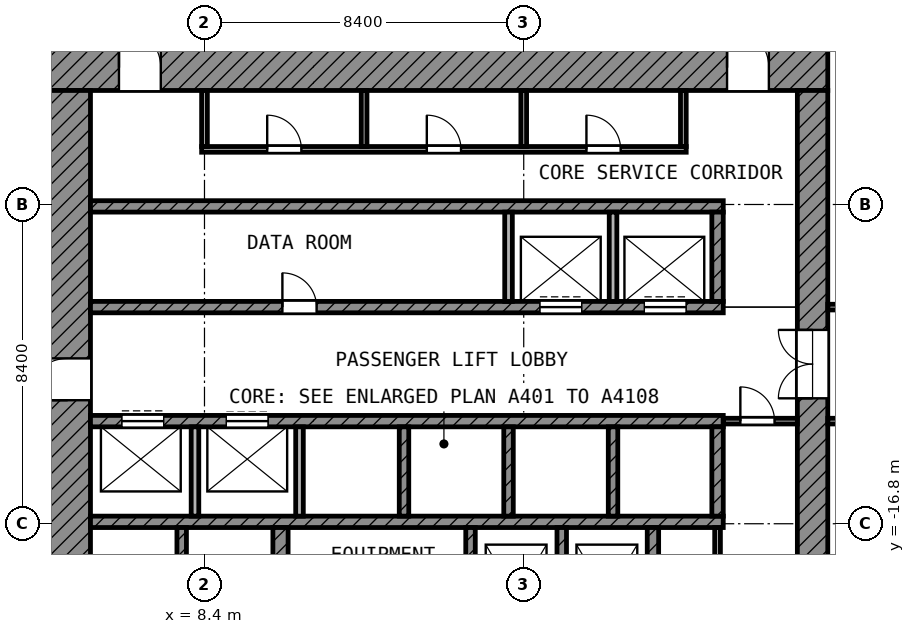
"""IFC4 building model, lengths in metres.
Left out: names, types, materials, properties, quantities, classifications, styles, units other than length and angle.
Written with IfcOpenShell. Run it as: python <this file> out.ifc"""

import sys

from ifc_helpers import new_model, si_unit, direction, frame, frame_2d, origin, place, context, subcontext, project, spatial, rectangle, extrude, element, fill, save


model = new_model("IFC4")
c1 = context("Model", 3, precision=1e-05, world=origin(), true_north=direction((0.0, 1.0)))
c2 = subcontext(c1, "Body", "Model", "MODEL_VIEW")
j1 = project(units=[si_unit("LENGTHUNIT", "METRE"), si_unit("PLANEANGLEUNIT", "RADIAN")], contexts=[c1])
p1 = place(None, origin())
s1 = spatial("IfcSite", under=j1, at=p1, CompositionType="ELEMENT")
p2 = place(p1, origin())
s2 = spatial("IfcBuilding", under=s1, at=p2, CompositionType="ELEMENT")
p3 = place(p2, frame((0.0, 0.0, 230.6)))
s3 = spatial("IfcBuildingStorey", under=s2, at=p3, CompositionType="ELEMENT", Elevation=230.6)
p4 = place(p3, frame((4.2, -4.8, 0.0), z_axis=(0.0, 0.0, 1.0), x_axis=(1.0, 0.0, 0.0)))
e1 = element("IfcWall", 1, at=p4, inside=s3, PredefinedType="SHEAR", context=c2, shape_type="SweptSolid", body=[
    extrude(rectangle(XDim=20.6, YDim=1.2, at=frame_2d((10.3, 0.0))), origin(), (0.0, 0.0, 1.0), 3.6),
])
p5 = place(p4, frame((1.95, 0.0, 0.0)))
e2 = element("IfcOpeningElement", 2, at=p5, cuts=e1, PredefinedType="OPENING", context=c2, shape_type="SweptSolid", body=[
    extrude(rectangle(XDim=1.1, YDim=2.1, at=frame_2d((0.55, 1.05))), frame((0.0, 0.61, 0.0), z_axis=(0.0, -1.0, 0.0), x_axis=(1.0, 0.0, 0.0)), (0.0, 0.0, 1.0), 1.22),
])
p6 = place(p4, frame((17.95, 0.0, 0.0)))
e3 = element("IfcOpeningElement", 3, at=p6, cuts=e1, PredefinedType="OPENING", context=c2, shape_type="SweptSolid", body=[
    extrude(rectangle(XDim=1.1, YDim=2.1, at=frame_2d((0.55, 1.05))), frame((0.0, 0.61, 0.0), z_axis=(0.0, -1.0, 0.0), x_axis=(1.0, 0.0, 0.0)), (0.0, 0.0, 1.0), 1.22),
])
p7 = place(p3, frame((4.8, -24.8, 0.0), z_axis=(0.0, 0.0, 1.0), x_axis=(0.0, 1.0, 0.0)))
e4 = element("IfcWall", 4, at=p7, inside=s3, PredefinedType="SHEAR", context=c2, shape_type="SweptSolid", body=[
    extrude(rectangle(XDim=19.4, YDim=1.2, at=frame_2d((9.7, 0.0))), origin(), (0.0, 0.0, 1.0), 3.6),
])
p8 = place(p7, frame((11.25, 0.0, 0.0)))
e5 = element("IfcOpeningElement", 5, at=p8, cuts=e4, PredefinedType="OPENING", context=c2, shape_type="SweptSolid", body=[
    extrude(rectangle(XDim=1.1, YDim=2.1, at=frame_2d((0.55, 1.05))), frame((0.0, 0.61, 0.0), z_axis=(0.0, -1.0, 0.0), x_axis=(1.0, 0.0, 0.0)), (0.0, 0.0, 1.0), 1.22),
])
p9 = place(p7, frame((1.95, 0.0, 0.0)))
e6 = element("IfcOpeningElement", 6, at=p9, cuts=e4, PredefinedType="OPENING", context=c2, shape_type="SweptSolid", body=[
    extrude(rectangle(XDim=1.1, YDim=2.1, at=frame_2d((0.55, 1.05))), frame((0.0, 0.61, 0.0), z_axis=(0.0, -1.0, 0.0), x_axis=(1.0, 0.0, 0.0)), (0.0, 0.0, 1.0), 1.22),
])
p10 = place(p3, frame((24.4, -24.0, 0.0), z_axis=(0.0, 0.0, 1.0), x_axis=(0.0, 1.0, 0.0)))
e7 = element("IfcWall", 7, at=p10, inside=s3, PredefinedType="SHEAR", context=c2, shape_type="SweptSolid", body=[
    extrude(rectangle(XDim=18.6, YDim=0.8, at=frame_2d((9.3, 0.0))), origin(), (0.0, 0.0, 1.0), 3.6),
])
p11 = place(p10, frame((10.5, 0.0, 0.0)))
e8 = element("IfcOpeningElement", 8, at=p11, cuts=e7, PredefinedType="OPENING", context=c2, shape_type="SweptSolid", body=[
    extrude(rectangle(XDim=1.8, YDim=2.1, at=frame_2d((0.9, 1.05))), frame((0.0, 0.41, 0.0), z_axis=(0.0, -1.0, 0.0), x_axis=(1.0, 0.0, 0.0)), (0.0, 0.0, 1.0), 0.82),
])
p12 = place(p3, frame((5.4, -8.45, 0.0), z_axis=(0.0, 0.0, 1.0), x_axis=(1.0, 0.0, 0.0)))
e9 = element("IfcWall", 9, at=p12, inside=s3, PredefinedType="SHEAR", context=c2, shape_type="SweptSolid", body=[
    extrude(rectangle(XDim=16.65, YDim=0.3, at=frame_2d((8.325, 0.0))), origin(), (0.0, 0.0, 1.0), 3.6),
])
p13 = place(p3, frame((5.4, -11.1, 0.0), z_axis=(0.0, 0.0, 1.0), x_axis=(1.0, 0.0, 0.0)))
e10 = element("IfcWall", 10, at=p13, inside=s3, PredefinedType="SHEAR", context=c2, shape_type="SweptSolid", body=[
    extrude(rectangle(XDim=16.65, YDim=0.3, at=frame_2d((8.325, 0.0))), origin(), (0.0, 0.0, 1.0), 3.6),
])
p14 = place(p13, frame((11.825, 0.0, 0.0)))
e11 = element("IfcOpeningElement", 11, at=p14, cuts=e10, PredefinedType="OPENING", context=c2, shape_type="SweptSolid", body=[
    extrude(rectangle(XDim=1.1, YDim=2.1, at=frame_2d((0.55, 1.05))), frame((0.0, 0.16, 0.0), z_axis=(0.0, -1.0, 0.0), x_axis=(1.0, 0.0, 0.0)), (0.0, 0.0, 1.0), 0.32),
])
p15 = place(p13, frame((14.575, 0.0, 0.0)))
e12 = element("IfcOpeningElement", 12, at=p15, cuts=e10, PredefinedType="OPENING", context=c2, shape_type="SweptSolid", body=[
    extrude(rectangle(XDim=1.1, YDim=2.1, at=frame_2d((0.55, 1.05))), frame((0.0, 0.16, 0.0), z_axis=(0.0, -1.0, 0.0), x_axis=(1.0, 0.0, 0.0)), (0.0, 0.0, 1.0), 0.32),
])
p16 = place(p13, frame((5.05, 0.0, 0.0)))
e13 = element("IfcOpeningElement", 13, at=p16, cuts=e10, PredefinedType="OPENING", context=c2, shape_type="SweptSolid", body=[
    extrude(rectangle(XDim=0.9, YDim=2.1, at=frame_2d((0.45, 1.05))), frame((0.0, 0.16, 0.0), z_axis=(0.0, -1.0, 0.0), x_axis=(1.0, 0.0, 0.0)), (0.0, 0.0, 1.0), 0.32),
])
p17 = place(p3, frame((5.4, -14.1, 0.0), z_axis=(0.0, 0.0, 1.0), x_axis=(1.0, 0.0, 0.0)))
e14 = element("IfcWall", 14, at=p17, inside=s3, PredefinedType="SHEAR", context=c2, shape_type="SweptSolid", body=[
    extrude(rectangle(XDim=16.65, YDim=0.3, at=frame_2d((8.325, 0.0))), origin(), (0.0, 0.0, 1.0), 3.6),
])
p18 = place(p17, frame((0.825, 0.0, 0.0)))
e15 = element("IfcOpeningElement", 15, at=p18, cuts=e14, PredefinedType="OPENING", context=c2, shape_type="SweptSolid", body=[
    extrude(rectangle(XDim=1.1, YDim=2.1, at=frame_2d((0.55, 1.05))), frame((0.0, 0.16, 0.0), z_axis=(0.0, -1.0, 0.0), x_axis=(1.0, 0.0, 0.0)), (0.0, 0.0, 1.0), 0.32),
])
p19 = place(p17, frame((3.575, 0.0, 0.0)))
e16 = element("IfcOpeningElement", 16, at=p19, cuts=e14, PredefinedType="OPENING", context=c2, shape_type="SweptSolid", body=[
    extrude(rectangle(XDim=1.1, YDim=2.1, at=frame_2d((0.55, 1.05))), frame((0.0, 0.16, 0.0), z_axis=(0.0, -1.0, 0.0), x_axis=(1.0, 0.0, 0.0)), (0.0, 0.0, 1.0), 0.32),
])
p20 = place(p3, frame((5.4, -16.75, 0.0), z_axis=(0.0, 0.0, 1.0), x_axis=(1.0, 0.0, 0.0)))
e17 = element("IfcWall", 17, at=p20, inside=s3, PredefinedType="SHEAR", context=c2, shape_type="SweptSolid", body=[
    extrude(rectangle(XDim=16.65, YDim=0.3, at=frame_2d((8.325, 0.0))), origin(), (0.0, 0.0, 1.0), 3.6),
])
p21 = place(p3, frame((10.4, -20.05, 0.0), z_axis=(0.0, 0.0, 1.0), x_axis=(0.0, 1.0, 0.0)))
e18 = element("IfcWall", 18, at=p21, inside=s3, PredefinedType="SHEAR", context=c2, shape_type="SweptSolid", body=[
    extrude(rectangle(XDim=3.15, YDim=0.4, at=frame_2d((1.575, 0.0))), origin(), (0.0, 0.0, 1.0), 3.6),
])
p22 = place(p3, frame((20.2, -20.35, 0.0), z_axis=(0.0, 0.0, 1.0), x_axis=(0.0, 1.0, 0.0)))
e19 = element("IfcWall", 19, at=p22, inside=s3, PredefinedType="SHEAR", context=c2, shape_type="SweptSolid", body=[
    extrude(rectangle(XDim=3.45, YDim=0.3, at=frame_2d((1.725, 0.0))), origin(), (0.0, 0.0, 1.0), 3.6),
])
p23 = place(p3, frame((21.9, -10.95, 0.0), z_axis=(0.0, 0.0, 1.0), x_axis=(0.0, 1.0, 0.0)))
e20 = element("IfcWall", 20, at=p23, inside=s3, PredefinedType="SHEAR", context=c2, shape_type="SweptSolid", body=[
    extrude(rectangle(XDim=2.35, YDim=0.3, at=frame_2d((1.175, 0.0))), origin(), (0.0, 0.0, 1.0), 3.6),
])
p24 = place(p3, frame((21.9, -16.6, 0.0), z_axis=(0.0, 0.0, 1.0), x_axis=(0.0, 1.0, 0.0)))
e21 = element("IfcWall", 21, at=p24, inside=s3, PredefinedType="SHEAR", context=c2, shape_type="SweptSolid", body=[
    extrude(rectangle(XDim=2.35, YDim=0.3, at=frame_2d((1.175, 0.0))), origin(), (0.0, 0.0, 1.0), 3.6),
])
for number, where, z_axis, x_axis in (
    (22, (7.8, -20.05, 0.0), (0.0, 0.0, 1.0), (0.0, 1.0, 0.0)),
    (23, (15.4, -20.05, 0.0), (0.0, 0.0, 1.0), (0.0, 1.0, 0.0)),
    (24, (17.8, -20.05, 0.0), (0.0, 0.0, 1.0), (0.0, 1.0, 0.0)),
):
    element("IfcWall", number, at=place(p3, frame(where, z_axis=z_axis, x_axis=x_axis)), inside=s3, PredefinedType="SHEAR", context=c2, shape_type="SweptSolid", body=[
        extrude(rectangle(XDim=3.15, YDim=0.25, at=frame_2d((1.575, 0.0))), origin(), (0.0, 0.0, 1.0), 3.6),
    ])
for number, where, z_axis, x_axis in (
    (25, (16.4, -10.95, 0.0), (0.0, 0.0, 1.0), (0.0, 1.0, 0.0)),
    (26, (19.15, -10.95, 0.0), (0.0, 0.0, 1.0), (0.0, 1.0, 0.0)),
):
    element("IfcWall", number, at=place(p3, frame(where, z_axis=z_axis, x_axis=x_axis)), inside=s3, PredefinedType="PARTITIONING", context=c2, shape_type="SweptSolid", body=[
        extrude(rectangle(XDim=2.35, YDim=0.2, at=frame_2d((1.175, 0.0))), origin(), (0.0, 0.0, 1.0), 3.6),
    ])
for number, where, z_axis, x_axis in (
    (27, (8.15, -16.6, 0.0), (0.0, 0.0, 1.0), (0.0, 1.0, 0.0)),
    (28, (10.9, -16.6, 0.0), (0.0, 0.0, 1.0), (0.0, 1.0, 0.0)),
):
    element("IfcWall", number, at=place(p3, frame(where, z_axis=z_axis, x_axis=x_axis)), inside=s3, PredefinedType="PARTITIONING", context=c2, shape_type="SweptSolid", body=[
        extrude(rectangle(XDim=2.35, YDim=0.2, at=frame_2d((1.175, 0.0))), origin(), (0.0, 0.0, 1.0), 3.6),
    ])
for number, where, z_axis, x_axis in (
    (29, (13.65, -16.6, 0.0), (0.0, 0.0, 1.0), (0.0, 1.0, 0.0)),
    (30, (16.4, -16.6, 0.0), (0.0, 0.0, 1.0), (0.0, 1.0, 0.0)),
    (31, (19.15, -16.6, 0.0), (0.0, 0.0, 1.0), (0.0, 1.0, 0.0)),
):
    element("IfcWall", number, at=place(p3, frame(where, z_axis=z_axis, x_axis=x_axis)), inside=s3, PredefinedType="SHEAR", context=c2, shape_type="SweptSolid", body=[
        extrude(rectangle(XDim=2.35, YDim=0.25, at=frame_2d((1.175, 0.0))), origin(), (0.0, 0.0, 1.0), 3.6),
    ])
p25 = place(p3, frame((21.9, -19.05, 0.0), z_axis=(0.0, 0.0, 1.0), x_axis=(0.0, 1.0, 0.0)))
e32 = element("IfcWall", 32, at=p25, inside=s3, PredefinedType="PARTITIONING", context=c2, shape_type="SweptSolid", body=[
    extrude(rectangle(XDim=2.15, YDim=0.15, at=frame_2d((1.075, 0.0))), origin(), (0.0, 0.0, 1.0), 3.6),
])
p26 = place(p3, frame((22.05, -14.1, 0.0), z_axis=(0.0, 0.0, 1.0), x_axis=(1.0, 0.0, 0.0)))
e33 = element("IfcWall", 33, at=p26, inside=s3, PredefinedType="PARTITIONING", context=c2, shape_type="SweptSolid", body=[
    extrude(rectangle(XDim=1.95, YDim=0.15, at=frame_2d((0.975, 0.0))), origin(), (0.0, 0.0, 1.0), 3.6),
])
p27 = place(p26, frame((0.45, 0.0, 0.0)))
e34 = element("IfcOpeningElement", 34, at=p27, cuts=e33, PredefinedType="OPENING", context=c2, shape_type="SweptSolid", body=[
    extrude(rectangle(XDim=0.9, YDim=2.1, at=frame_2d((0.45, 1.05))), frame((0.0, 0.085, 0.0), z_axis=(0.0, -1.0, 0.0), x_axis=(1.0, 0.0, 0.0)), (0.0, 0.0, 1.0), 0.17),
])
p28 = place(p3, frame((8.325, -6.95, 0.0), z_axis=(0.0, 0.0, 1.0), x_axis=(1.0, 0.0, 0.0)))
e35 = element("IfcWall", 35, at=p28, inside=s3, PredefinedType="PARTITIONING", context=c2, shape_type="SweptSolid", body=[
    extrude(rectangle(XDim=12.75, YDim=0.15, at=frame_2d((6.375, 0.0))), origin(), (0.0, 0.0, 1.0), 3.6),
])
p29 = place(p28, frame((1.725, 0.0, 0.0)))
e36 = element("IfcOpeningElement", 36, at=p29, cuts=e35, PredefinedType="OPENING", context=c2, shape_type="SweptSolid", body=[
    extrude(rectangle(XDim=0.9, YDim=2.1, at=frame_2d((0.45, 1.05))), frame((0.0, 0.085, 0.0), z_axis=(0.0, -1.0, 0.0), x_axis=(1.0, 0.0, 0.0)), (0.0, 0.0, 1.0), 0.17),
])
p30 = place(p28, frame((5.925, 0.0, 0.0)))
e37 = element("IfcOpeningElement", 37, at=p30, cuts=e35, PredefinedType="OPENING", context=c2, shape_type="SweptSolid", body=[
    extrude(rectangle(XDim=0.9, YDim=2.1, at=frame_2d((0.45, 1.05))), frame((0.0, 0.085, 0.0), z_axis=(0.0, -1.0, 0.0), x_axis=(1.0, 0.0, 0.0)), (0.0, 0.0, 1.0), 0.17),
])
p31 = place(p28, frame((10.125, 0.0, 0.0)))
e38 = element("IfcOpeningElement", 38, at=p31, cuts=e35, PredefinedType="OPENING", context=c2, shape_type="SweptSolid", body=[
    extrude(rectangle(XDim=0.9, YDim=2.1, at=frame_2d((0.45, 1.05))), frame((0.0, 0.085, 0.0), z_axis=(0.0, -1.0, 0.0), x_axis=(1.0, 0.0, 0.0)), (0.0, 0.0, 1.0), 0.17),
])
for number, where, z_axis, x_axis in (
    (39, (8.4, -6.875, 0.0), (0.0, 0.0, 1.0), (0.0, 1.0, 0.0)),
    (40, (12.6, -6.875, 0.0), (0.0, 0.0, 1.0), (0.0, 1.0, 0.0)),
    (41, (16.8, -6.875, 0.0), (0.0, 0.0, 1.0), (0.0, 1.0, 0.0)),
    (42, (21.0, -6.875, 0.0), (0.0, 0.0, 1.0), (0.0, 1.0, 0.0)),
):
    element("IfcWall", number, at=place(p3, frame(where, z_axis=z_axis, x_axis=x_axis)), inside=s3, PredefinedType="PARTITIONING", context=c2, shape_type="SweptSolid", body=[
        extrude(rectangle(XDim=1.475, YDim=0.15, at=frame_2d((0.738, 0.0))), origin(), (0.0, 0.0, 1.0), 3.6),
    ])
p32 = place(p3, frame((24.8, -14.1, 0.0), z_axis=(0.0, 0.0, 1.0), x_axis=(1.0, 0.0, 0.0)))
e43 = element("IfcWall", 43, at=p32, inside=s3, PredefinedType="PARTITIONING", context=c2, shape_type="SweptSolid", body=[
    extrude(rectangle(XDim=4.525, YDim=0.15, at=frame_2d((2.262, 0.0))), origin(), (0.0, 0.0, 1.0), 3.6),
])
p33 = place(p32, frame((1.75, 0.0, 0.0)))
e44 = element("IfcOpeningElement", 44, at=p33, cuts=e43, PredefinedType="OPENING", context=c2, shape_type="SweptSolid", body=[
    extrude(rectangle(XDim=1.5, YDim=2.1, at=frame_2d((0.75, 1.05))), frame((0.0, 0.085, 0.0), z_axis=(0.0, -1.0, 0.0), x_axis=(1.0, 0.0, 0.0)), (0.0, 0.0, 1.0), 0.17),
])
p34 = place(p3, frame((24.8, -11.1, 0.0), z_axis=(0.0, 0.0, 1.0), x_axis=(1.0, 0.0, 0.0)))
e45 = element("IfcWall", 45, at=p34, inside=s3, PredefinedType="PARTITIONING", context=c2, shape_type="SweptSolid", body=[
    extrude(rectangle(XDim=4.525, YDim=0.15, at=frame_2d((2.262, 0.0))), origin(), (0.0, 0.0, 1.0), 3.6),
])
p35 = place(p34, frame((1.0, 0.0, 0.0)))
e46 = element("IfcOpeningElement", 46, at=p35, cuts=e45, PredefinedType="OPENING", context=c2, shape_type="SweptSolid", body=[
    extrude(rectangle(XDim=0.9, YDim=2.1, at=frame_2d((0.45, 1.05))), frame((0.0, 0.085, 0.0), z_axis=(0.0, -1.0, 0.0), x_axis=(1.0, 0.0, 0.0)), (0.0, 0.0, 1.0), 0.17),
])
p36 = place(p34, frame((3.05, 0.0, 0.0)))
e47 = element("IfcOpeningElement", 47, at=p36, cuts=e45, PredefinedType="OPENING", context=c2, shape_type="SweptSolid", body=[
    extrude(rectangle(XDim=1.0, YDim=2.1, at=frame_2d((0.5, 1.05))), frame((0.0, 0.085, 0.0), z_axis=(0.0, -1.0, 0.0), x_axis=(1.0, 0.0, 0.0)), (0.0, 0.0, 1.0), 0.17),
])
p37 = place(p14, origin())
e48 = element("IfcDoor", 48, at=p37, inside=s3, OperationType="DOUBLE_DOOR_SLIDING", PredefinedType="DOOR", context=c2, shape_type="SweptSolid", body=[
    extrude(rectangle(XDim=1.1, YDim=2.1, at=frame_2d((0.55, 1.05))), frame((0.0, 0.025, 0.0), z_axis=(0.0, -1.0, 0.0), x_axis=(1.0, 0.0, 0.0)), (0.0, 0.0, 1.0), 0.05),
])
fill(e11, e48)
p38 = place(p15, origin())
e49 = element("IfcDoor", 49, at=p38, inside=s3, OperationType="DOUBLE_DOOR_SLIDING", PredefinedType="DOOR", context=c2, shape_type="SweptSolid", body=[
    extrude(rectangle(XDim=1.1, YDim=2.1, at=frame_2d((0.55, 1.05))), frame((0.0, 0.025, 0.0), z_axis=(0.0, -1.0, 0.0), x_axis=(1.0, 0.0, 0.0)), (0.0, 0.0, 1.0), 0.05),
])
fill(e12, e49)
p39 = place(p18, origin())
e50 = element("IfcDoor", 50, at=p39, inside=s3, OperationType="DOUBLE_DOOR_SLIDING", PredefinedType="DOOR", context=c2, shape_type="SweptSolid", body=[
    extrude(rectangle(XDim=1.1, YDim=2.1, at=frame_2d((0.55, 1.05))), frame((0.0, 0.025, 0.0), z_axis=(0.0, -1.0, 0.0), x_axis=(1.0, 0.0, 0.0)), (0.0, 0.0, 1.0), 0.05),
])
fill(e15, e50)
p40 = place(p19, origin())
e51 = element("IfcDoor", 51, at=p40, inside=s3, OperationType="DOUBLE_DOOR_SLIDING", PredefinedType="DOOR", context=c2, shape_type="SweptSolid", body=[
    extrude(rectangle(XDim=1.1, YDim=2.1, at=frame_2d((0.55, 1.05))), frame((0.0, 0.025, 0.0), z_axis=(0.0, -1.0, 0.0), x_axis=(1.0, 0.0, 0.0)), (0.0, 0.0, 1.0), 0.05),
])
fill(e16, e51)
p41 = place(p8, origin())
e52 = element("IfcDoor", 52, at=p41, inside=s3, OperationType="SINGLE_SWING_LEFT", PredefinedType="DOOR", context=c2, shape_type="SweptSolid", body=[
    extrude(rectangle(XDim=1.1, YDim=2.1, at=frame_2d((0.55, 1.05))), frame((0.0, 0.025, 0.0), z_axis=(0.0, -1.0, 0.0), x_axis=(1.0, 0.0, 0.0)), (0.0, 0.0, 1.0), 0.05),
])
fill(e5, e52)
p42 = place(p5, origin())
e53 = element("IfcDoor", 53, at=p42, inside=s3, OperationType="SINGLE_SWING_LEFT", PredefinedType="DOOR", context=c2, shape_type="SweptSolid", body=[
    extrude(rectangle(XDim=1.1, YDim=2.1, at=frame_2d((0.55, 1.05))), frame((0.0, 0.025, 0.0), z_axis=(0.0, -1.0, 0.0), x_axis=(1.0, 0.0, 0.0)), (0.0, 0.0, 1.0), 0.05),
])
fill(e2, e53)
p43 = place(p6, origin())
e54 = element("IfcDoor", 54, at=p43, inside=s3, OperationType="SINGLE_SWING_LEFT", PredefinedType="DOOR", context=c2, shape_type="SweptSolid", body=[
    extrude(rectangle(XDim=1.1, YDim=2.1, at=frame_2d((0.55, 1.05))), frame((0.0, 0.025, 0.0), z_axis=(0.0, -1.0, 0.0), x_axis=(1.0, 0.0, 0.0)), (0.0, 0.0, 1.0), 0.05),
])
fill(e3, e54)
p44 = place(p11, origin())
e55 = element("IfcDoor", 55, at=p44, inside=s3, OperationType="DOUBLE_DOOR_SINGLE_SWING", PredefinedType="DOOR", context=c2, shape_type="SweptSolid", body=[
    extrude(rectangle(XDim=1.8, YDim=2.1, at=frame_2d((0.9, 1.05))), frame((0.0, 0.025, 0.0), z_axis=(0.0, -1.0, 0.0), x_axis=(1.0, 0.0, 0.0)), (0.0, 0.0, 1.0), 0.05),
])
fill(e8, e55)
p45 = place(p29, origin())
e56 = element("IfcDoor", 56, at=p45, inside=s3, OperationType="SINGLE_SWING_LEFT", PredefinedType="DOOR", context=c2, shape_type="SweptSolid", body=[
    extrude(rectangle(XDim=0.9, YDim=2.1, at=frame_2d((0.45, 1.05))), frame((0.0, 0.025, 0.0), z_axis=(0.0, -1.0, 0.0), x_axis=(1.0, 0.0, 0.0)), (0.0, 0.0, 1.0), 0.05),
])
fill(e36, e56)
p46 = place(p30, origin())
e57 = element("IfcDoor", 57, at=p46, inside=s3, OperationType="SINGLE_SWING_LEFT", PredefinedType="DOOR", context=c2, shape_type="SweptSolid", body=[
    extrude(rectangle(XDim=0.9, YDim=2.1, at=frame_2d((0.45, 1.05))), frame((0.0, 0.025, 0.0), z_axis=(0.0, -1.0, 0.0), x_axis=(1.0, 0.0, 0.0)), (0.0, 0.0, 1.0), 0.05),
])
fill(e37, e57)
p47 = place(p31, origin())
e58 = element("IfcDoor", 58, at=p47, inside=s3, OperationType="SINGLE_SWING_LEFT", PredefinedType="DOOR", context=c2, shape_type="SweptSolid", body=[
    extrude(rectangle(XDim=0.9, YDim=2.1, at=frame_2d((0.45, 1.05))), frame((0.0, 0.025, 0.0), z_axis=(0.0, -1.0, 0.0), x_axis=(1.0, 0.0, 0.0)), (0.0, 0.0, 1.0), 0.05),
])
fill(e38, e58)
p48 = place(p27, origin())
e59 = element("IfcDoor", 59, at=p48, inside=s3, OperationType="SINGLE_SWING_LEFT", PredefinedType="DOOR", context=c2, shape_type="SweptSolid", body=[
    extrude(rectangle(XDim=0.9, YDim=2.1, at=frame_2d((0.45, 1.05))), frame((0.0, 0.025, 0.0), z_axis=(0.0, -1.0, 0.0), x_axis=(1.0, 0.0, 0.0)), (0.0, 0.0, 1.0), 0.05),
])
fill(e34, e59)
p49 = place(p16, origin())
e60 = element("IfcDoor", 60, at=p49, inside=s3, OperationType="SINGLE_SWING_LEFT", PredefinedType="DOOR", context=c2, shape_type="SweptSolid", body=[
    extrude(rectangle(XDim=0.9, YDim=2.1, at=frame_2d((0.45, 1.05))), frame((0.0, 0.025, 0.0), z_axis=(0.0, -1.0, 0.0), x_axis=(1.0, 0.0, 0.0)), (0.0, 0.0, 1.0), 0.05),
])
fill(e13, e60)
save(model, sys.argv[1])
